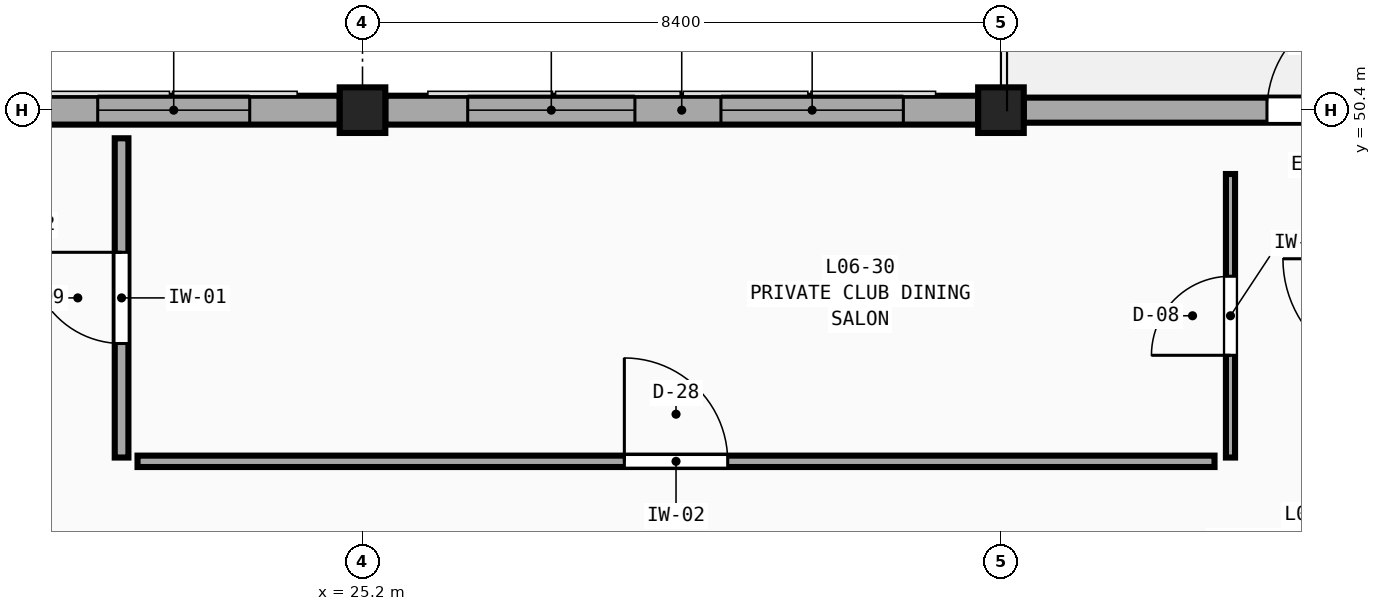
"""IFC4 building model, lengths in metres.
Left out: names, types, materials, properties, quantities, classifications, styles, units other than length and angle.
Written with IfcOpenShell. Run it as: python <this file> out.ifc"""

import sys

from ifc_helpers import new_model, si_unit, direction, frame, frame_2d, origin, origin_2d, place, context, subcontext, project, spatial, rectangle, extrude, element, fill, save


model = new_model("IFC4")
c1 = context("Model", 3, precision=1e-05, world=origin(), true_north=direction((0.0, 1.0)))
c2 = subcontext(c1, "Body", "Model", "MODEL_VIEW")
j1 = project(units=[si_unit("LENGTHUNIT", "METRE"), si_unit("PLANEANGLEUNIT", "RADIAN")], contexts=[c1])
p1 = place(None, origin())
s1 = spatial("IfcSite", under=j1, at=p1, CompositionType="ELEMENT")
p2 = place(p1, origin())
s2 = spatial("IfcBuilding", under=s1, at=p2, CompositionType="ELEMENT")
p3 = place(p2, frame((0.0, 0.0, 27.9)))
s3 = spatial("IfcBuildingStorey", under=s2, at=p3, CompositionType="ELEMENT", Elevation=27.9)
for number, where, z_axis, x_axis in (
    (1, (25.2, 50.4, 0.0), (0.0, 0.0, 1.0), (1.0, 0.0, 0.0)),
    (2, (33.6, 50.4, 0.0), (0.0, 0.0, 1.0), (1.0, 0.0, 0.0)),
):
    element("IfcColumn", number, at=place(p3, frame(where, z_axis=z_axis, x_axis=x_axis)), inside=s3, PredefinedType="COLUMN", context=c2, shape_type="SweptSolid", body=[
        extrude(rectangle(XDim=0.6, YDim=0.6, at=origin_2d()), origin(), (0.0, 0.0, 1.0), 4.2),
    ])
p4 = place(p3, frame((17.1, 50.4, 0.0), z_axis=(0.0, 0.0, 1.0), x_axis=(1.0, 0.0, 0.0)))
e3 = element("IfcWall", 3, at=p4, inside=s3, PredefinedType="SOLIDWALL", context=c2, shape_type="SweptSolid", body=[
    extrude(rectangle(XDim=7.8, YDim=0.38, at=frame_2d((3.9, 0.0))), origin(), (0.0, 0.0, 1.0), 3.36),
])
p5 = place(p4, frame((1.284, 0.0, 0.75)))
e4 = element("IfcOpeningElement", 4, at=p5, cuts=e3, PredefinedType="OPENING", context=c2, shape_type="SweptSolid", body=[
    extrude(rectangle(XDim=1.8, YDim=2.46, at=frame_2d((0.9, 1.23))), frame((0.0, 0.21, 0.0), z_axis=(0.0, -1.0, 0.0), x_axis=(1.0, 0.0, 0.0)), (0.0, 0.0, 1.0), 0.42),
])
p6 = place(p4, frame((4.616, 0.0, 0.75)))
e5 = element("IfcOpeningElement", 5, at=p6, cuts=e3, PredefinedType="OPENING", context=c2, shape_type="SweptSolid", body=[
    extrude(rectangle(XDim=2.0, YDim=2.46, at=frame_2d((1.0, 1.23))), frame((0.0, 0.21, 0.0), z_axis=(0.0, -1.0, 0.0), x_axis=(1.0, 0.0, 0.0)), (0.0, 0.0, 1.0), 0.42),
])
p7 = place(p3, frame((25.5, 50.4, 0.0), z_axis=(0.0, 0.0, 1.0), x_axis=(1.0, 0.0, 0.0)))
e6 = element("IfcWall", 6, at=p7, inside=s3, PredefinedType="SOLIDWALL", context=c2, shape_type="SweptSolid", body=[
    extrude(rectangle(XDim=7.8, YDim=0.38, at=frame_2d((3.9, 0.0))), origin(), (0.0, 0.0, 1.0), 3.36),
])
p8 = place(p7, frame((1.084, 0.0, 0.75)))
e7 = element("IfcOpeningElement", 7, at=p8, cuts=e6, PredefinedType="OPENING", context=c2, shape_type="SweptSolid", body=[
    extrude(rectangle(XDim=2.2, YDim=2.46, at=frame_2d((1.1, 1.23))), frame((0.0, 0.21, 0.0), z_axis=(0.0, -1.0, 0.0), x_axis=(1.0, 0.0, 0.0)), (0.0, 0.0, 1.0), 0.42),
])
p9 = place(p7, frame((4.416, 0.0, 0.75)))
e8 = element("IfcOpeningElement", 8, at=p9, cuts=e6, PredefinedType="OPENING", context=c2, shape_type="SweptSolid", body=[
    extrude(rectangle(XDim=2.4, YDim=2.46, at=frame_2d((1.2, 1.23))), frame((0.0, 0.21, 0.0), z_axis=(0.0, -1.0, 0.0), x_axis=(1.0, 0.0, 0.0)), (0.0, 0.0, 1.0), 0.42),
])
p10 = place(p3, frame((33.9, 50.4, 0.0), z_axis=(0.0, 0.0, 1.0), x_axis=(1.0, 0.0, 0.0)))
e9 = element("IfcWall", 9, at=p10, inside=s3, PredefinedType="SOLIDWALL", context=c2, shape_type="SweptSolid", body=[
    extrude(rectangle(XDim=7.8, YDim=0.33, at=frame_2d((3.9, 0.0))), origin(), (0.0, 0.0, 1.0), 3.36),
])
p11 = place(p10, frame((3.2, 0.0, 0.0)))
e10 = element("IfcOpeningElement", 10, at=p11, cuts=e9, PredefinedType="OPENING", context=c2, shape_type="SweptSolid", body=[
    extrude(rectangle(XDim=1.4, YDim=2.15, at=frame_2d((0.7, 1.075))), frame((0.0, 0.185, 0.0), z_axis=(0.0, -1.0, 0.0), x_axis=(1.0, 0.0, 0.0)), (0.0, 0.0, 1.0), 0.37),
])
p12 = place(p3, frame((22.24, 45.78, 0.0), z_axis=(0.0, 0.0, 1.0), x_axis=(1.0, 0.0, 0.0)))
e11 = element("IfcWall", 11, at=p12, inside=s3, PredefinedType="PARTITIONING", context=c2, shape_type="SweptSolid", body=[
    extrude(rectangle(XDim=14.17, YDim=0.15, at=frame_2d((7.085, 0.0))), origin(), (0.0, 0.0, 1.0), 3.91),
])
p13 = place(p12, frame((6.405, 0.0, 0.0)))
e12 = element("IfcOpeningElement", 12, at=p13, cuts=e11, PredefinedType="OPENING", context=c2, shape_type="SweptSolid", body=[
    extrude(rectangle(XDim=1.36, YDim=2.37, at=frame_2d((0.68, 1.185))), frame((0.0, 0.095, 0.0), z_axis=(0.0, -1.0, 0.0), x_axis=(1.0, 0.0, 0.0)), (0.0, 0.0, 1.0), 0.19),
])
p14 = place(p3, frame((36.62, 45.83, 0.0), z_axis=(0.0, 0.0, 1.0), x_axis=(0.0, 1.0, 0.0)))
e13 = element("IfcWall", 13, at=p14, inside=s3, PredefinedType="PARTITIONING", context=c2, shape_type="SweptSolid", body=[
    extrude(rectangle(XDim=3.73, YDim=0.12, at=frame_2d((1.865, 0.0))), origin(), (0.0, 0.0, 1.0), 3.91),
])
p15 = place(p14, frame((1.345, 0.0, 0.0)))
e14 = element("IfcOpeningElement", 14, at=p15, cuts=e13, PredefinedType="OPENING", context=c2, shape_type="SweptSolid", body=[
    extrude(rectangle(XDim=1.04, YDim=2.13, at=frame_2d((0.52, 1.065))), frame((0.0, 0.08, 0.0), z_axis=(0.0, -1.0, 0.0), x_axis=(1.0, 0.0, 0.0)), (0.0, 0.0, 1.0), 0.16),
])
p16 = place(p3, frame((22.03, 45.83, 0.0), z_axis=(0.0, 0.0, 1.0), x_axis=(0.0, 1.0, 0.0)))
e15 = element("IfcWall", 15, at=p16, inside=s3, PredefinedType="PARTITIONING", context=c2, shape_type="SweptSolid", body=[
    extrude(rectangle(XDim=4.2, YDim=0.18, at=frame_2d((2.1, 0.0))), origin(), (0.0, 0.0, 1.0), 3.91),
])
p17 = place(p16, frame((1.5, 0.0, 0.0)))
e16 = element("IfcOpeningElement", 16, at=p17, cuts=e15, PredefinedType="OPENING", context=c2, shape_type="SweptSolid", body=[
    extrude(rectangle(XDim=1.2, YDim=2.13, at=frame_2d((0.6, 1.065))), frame((0.0, 0.11, 0.0), z_axis=(0.0, -1.0, 0.0), x_axis=(1.0, 0.0, 0.0)), (0.0, 0.0, 1.0), 0.22),
])
p18 = place(p6, origin())
e17 = element("IfcWindow", 17, at=p18, inside=s3, PartitioningType="TRIPLE_PANEL_VERTICAL", PredefinedType="WINDOW", context=c2, shape_type="SweptSolid", body=[
    extrude(rectangle(XDim=2.0, YDim=2.46, at=frame_2d((1.0, 1.23))), frame((0.0, 0.03, 0.0), z_axis=(0.0, -1.0, 0.0), x_axis=(1.0, 0.0, 0.0)), (0.0, 0.0, 1.0), 0.06),
])
fill(e5, e17)
p19 = place(p8, origin())
e18 = element("IfcWindow", 18, at=p19, inside=s3, PartitioningType="TRIPLE_PANEL_VERTICAL", PredefinedType="WINDOW", context=c2, shape_type="SweptSolid", body=[
    extrude(rectangle(XDim=2.2, YDim=2.46, at=frame_2d((1.1, 1.23))), frame((0.0, 0.03, 0.0), z_axis=(0.0, -1.0, 0.0), x_axis=(1.0, 0.0, 0.0)), (0.0, 0.0, 1.0), 0.06),
])
fill(e7, e18)
p20 = place(p9, origin())
e19 = element("IfcWindow", 19, at=p20, inside=s3, PartitioningType="TRIPLE_PANEL_VERTICAL", PredefinedType="WINDOW", context=c2, shape_type="SweptSolid", body=[
    extrude(rectangle(XDim=2.4, YDim=2.46, at=frame_2d((1.2, 1.23))), frame((0.0, 0.03, 0.0), z_axis=(0.0, -1.0, 0.0), x_axis=(1.0, 0.0, 0.0)), (0.0, 0.0, 1.0), 0.06),
])
fill(e8, e19)
p21 = place(p11, origin())
e20 = element("IfcDoor", 20, at=p21, inside=s3, OperationType="SINGLE_SWING_RIGHT", PredefinedType="DOOR", context=c2, shape_type="SweptSolid", body=[
    extrude(rectangle(XDim=1.4, YDim=2.15, at=frame_2d((0.7, 1.075))), frame((0.0, 0.025, 0.0), z_axis=(0.0, -1.0, 0.0), x_axis=(1.0, 0.0, 0.0)), (0.0, 0.0, 1.0), 0.05),
])
fill(e10, e20)
p22 = place(p13, origin())
e21 = element("IfcDoor", 21, at=p22, inside=s3, OperationType="SINGLE_SWING_LEFT", PredefinedType="DOOR", context=c2, shape_type="SweptSolid", body=[
    extrude(rectangle(XDim=1.36, YDim=2.37, at=frame_2d((0.68, 1.185))), frame((0.0, 0.025, 0.0), z_axis=(0.0, -1.0, 0.0), x_axis=(1.0, 0.0, 0.0)), (0.0, 0.0, 1.0), 0.05),
])
fill(e12, e21)
p23 = place(p15, origin())
e22 = element("IfcDoor", 22, at=p23, inside=s3, OperationType="SINGLE_SWING_LEFT", PredefinedType="DOOR", context=c2, shape_type="SweptSolid", body=[
    extrude(rectangle(XDim=1.04, YDim=2.13, at=frame_2d((0.52, 1.065))), frame((0.0, 0.025, 0.0), z_axis=(0.0, -1.0, 0.0), x_axis=(1.0, 0.0, 0.0)), (0.0, 0.0, 1.0), 0.05),
])
fill(e14, e22)
p24 = place(p17, origin())
e23 = element("IfcDoor", 23, at=p24, inside=s3, OperationType="SINGLE_SWING_RIGHT", PredefinedType="DOOR", context=c2, shape_type="SweptSolid", body=[
    extrude(rectangle(XDim=1.2, YDim=2.13, at=frame_2d((0.6, 1.065))), frame((0.0, 0.025, 0.0), z_axis=(0.0, -1.0, 0.0), x_axis=(1.0, 0.0, 0.0)), (0.0, 0.0, 1.0), 0.05),
])
fill(e16, e23)
save(model, sys.argv[1])
